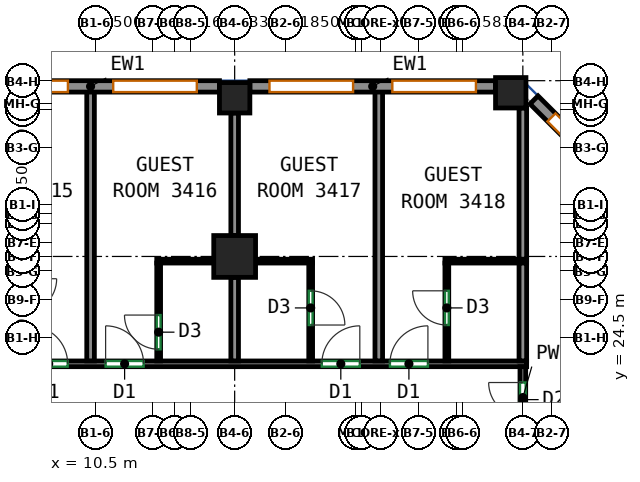
"""IFC4 building model, lengths in metres.
Left out: names, types, materials, properties, quantities, classifications, styles, units other than length and angle.
Written with IfcOpenShell. Run it as: python <this file> out.ifc"""

import sys

from ifc_helpers import new_model, si_unit, direction, frame, frame_2d, origin, origin_2d, place, context, subcontext, project, spatial, rectangle, extrude, source, transform, mapped, element, fill, save


model = new_model("IFC4")
c1 = context("Model", 3, precision=1e-05, world=origin(), true_north=direction((0.0, 1.0)))
c2 = subcontext(c1, "Body", "Model", "MODEL_VIEW")
j1 = project(units=[si_unit("LENGTHUNIT", "METRE"), si_unit("PLANEANGLEUNIT", "RADIAN")], contexts=[c1])
p1 = place(None, origin())
s1 = spatial("IfcSite", under=j1, at=p1, CompositionType="ELEMENT")
p2 = place(p1, origin())
s2 = spatial("IfcBuilding", under=s1, at=p2, CompositionType="ELEMENT")
p3 = place(p2, frame((0.0, 0.0, 150.7)))
s3 = spatial("IfcBuildingStorey", under=s2, at=p3, CompositionType="ELEMENT", Elevation=150.7)
m1 = source(origin(), c2, "Body", "SweptSolid", [
    extrude(rectangle(XDim=1.1, YDim=1.1, at=origin_2d()), origin(), (0.0, 0.0, 1.0), 3.12),
])
p4 = place(p3, frame((14.167, 26.625, 0.0), z_axis=(0.0, 0.0, 1.0), x_axis=(1.0, 0.0, 0.0)))
e1 = element("IfcColumn", 1, at=p4, inside=s3, PredefinedType="COLUMN", context=c2, shape_type="MappedRepresentation", body=[
    mapped(m1, transform((0.0, 0.0, 0.0))),
])
m2 = source(origin(), c2, "Body", "SweptSolid", [
    extrude(rectangle(XDim=0.8, YDim=0.8, at=origin_2d()), origin(), (0.0, 0.0, 1.0), 3.12),
])
for number, where, z_axis, x_axis in (
    (2, (14.167, 30.8, 0.0), (0.0, 0.0, 1.0), (1.0, 0.0, 0.0)),
    (3, (21.432, 30.932, 0.0), (0.0, 0.0, 1.0), (1.0, 0.0, 0.0)),
):
    element("IfcColumn", number, at=place(p3, frame(where, z_axis=z_axis, x_axis=x_axis)), inside=s3, PredefinedType="COLUMN", context=c2, shape_type="MappedRepresentation", body=[
        mapped(m2, transform((0.0, 0.0, 0.0))),
    ])
m3 = source(origin(), c2, "Body", "SweptSolid", [
    extrude(rectangle(XDim=3.5, YDim=0.3, at=frame_2d((1.75, 0.0))), origin(), (0.0, 0.0, 1.0), 3.12),
])
p5 = place(p3, frame((24.519, 28.269, 0.0), z_axis=(0.0, 0.0, 1.0), x_axis=(-0.70707190453, 0.707141656123, 0.0)))
e4 = element("IfcWall", 4, at=p5, inside=s3, PredefinedType="SOLIDWALL", context=c2, shape_type="MappedRepresentation", body=[
    mapped(m3, transform((0.0, 0.0, 0.0))),
])
p6 = place(p5, frame((0.65, 0.0, 0.85)))
e5 = element("IfcOpeningElement", 5, at=p6, cuts=e4, PredefinedType="OPENING", context=c2, shape_type="SweptSolid", body=[
    extrude(rectangle(XDim=2.2, YDim=1.95, at=frame_2d((1.1, 0.975))), frame((0.0, 0.16, 0.0), z_axis=(0.0, -1.0, 0.0), x_axis=(1.0, 0.0, 0.0)), (0.0, 0.0, 1.0), 0.32),
])
m4 = source(origin(), c2, "Body", "SweptSolid", [
    extrude(rectangle(XDim=6.465, YDim=0.3, at=frame_2d((3.232, 0.0))), origin(), (0.0, 0.0, 1.0), 3.12),
])
p7 = place(p3, frame((21.032, 31.1, 0.0), z_axis=(0.0, 0.0, 1.0), x_axis=(-1.0, 0.0, 0.0)))
e6 = element("IfcWall", 6, at=p7, inside=s3, PredefinedType="SOLIDWALL", context=c2, shape_type="MappedRepresentation", body=[
    mapped(m4, transform((0.0, 0.0, 0.0))),
])
p8 = place(p7, frame((0.516, 0.0, 0.85)))
e7 = element("IfcOpeningElement", 7, at=p8, cuts=e6, PredefinedType="OPENING", context=c2, shape_type="SweptSolid", body=[
    extrude(rectangle(XDim=2.2, YDim=1.95, at=frame_2d((1.1, 0.975))), frame((0.0, 0.16, 0.0), z_axis=(0.0, -1.0, 0.0), x_axis=(1.0, 0.0, 0.0)), (0.0, 0.0, 1.0), 0.32),
])
p9 = place(p7, frame((3.749, 0.0, 0.85)))
e8 = element("IfcOpeningElement", 8, at=p9, cuts=e6, PredefinedType="OPENING", context=c2, shape_type="SweptSolid", body=[
    extrude(rectangle(XDim=2.2, YDim=1.95, at=frame_2d((1.1, 0.975))), frame((0.0, 0.16, 0.0), z_axis=(0.0, -1.0, 0.0), x_axis=(1.0, 0.0, 0.0)), (0.0, 0.0, 1.0), 0.32),
])
m5 = source(origin(), c2, "Body", "SweptSolid", [
    extrude(rectangle(XDim=6.783, YDim=0.3, at=frame_2d((3.392, 0.0))), origin(), (0.0, 0.0, 1.0), 3.12),
])
p10 = place(p3, frame((13.767, 31.1, 0.0), z_axis=(0.0, 0.0, 1.0), x_axis=(-1.0, 0.0, 0.0)))
e9 = element("IfcWall", 9, at=p10, inside=s3, PredefinedType="SOLIDWALL", context=c2, shape_type="MappedRepresentation", body=[
    mapped(m5, transform((0.0, 0.0, 0.0))),
])
p11 = place(p10, frame((0.596, 0.0, 0.85)))
e10 = element("IfcOpeningElement", 10, at=p11, cuts=e9, PredefinedType="OPENING", context=c2, shape_type="SweptSolid", body=[
    extrude(rectangle(XDim=2.2, YDim=1.95, at=frame_2d((1.1, 0.975))), frame((0.0, 0.16, 0.0), z_axis=(0.0, -1.0, 0.0), x_axis=(1.0, 0.0, 0.0)), (0.0, 0.0, 1.0), 0.32),
])
p12 = place(p10, frame((3.988, 0.0, 0.85)))
e11 = element("IfcOpeningElement", 11, at=p12, cuts=e9, PredefinedType="OPENING", context=c2, shape_type="SweptSolid", body=[
    extrude(rectangle(XDim=2.2, YDim=1.95, at=frame_2d((1.1, 0.975))), frame((0.0, 0.16, 0.0), z_axis=(0.0, -1.0, 0.0), x_axis=(1.0, 0.0, 0.0)), (0.0, 0.0, 1.0), 0.32),
])
p13 = place(p3, frame((-20.059, 23.8, 0.0), z_axis=(0.0, 0.0, 1.0), x_axis=(1.0, 0.0, 0.0)))
e12 = element("IfcWall", 12, at=p13, inside=s3, PredefinedType="PARTITIONING", context=c2, shape_type="SweptSolid", body=[
    extrude(rectangle(XDim=41.909, YDim=0.15, at=frame_2d((20.955, 0.0))), origin(), (0.0, 0.0, 1.0), 3.12),
])
p14 = place(p13, frame((0.3, 0.0, 0.0)))
e13 = element("IfcOpeningElement", 13, at=p14, cuts=e12, PredefinedType="OPENING", context=c2, shape_type="SweptSolid", body=[
    extrude(rectangle(XDim=1.0, YDim=2.1, at=frame_2d((0.5, 1.05))), frame((0.0, 0.085, 0.0), z_axis=(0.0, -1.0, 0.0), x_axis=(1.0, 0.0, 0.0)), (0.0, 0.0, 1.0), 0.17),
])
p15 = place(p13, frame((6.391, 0.0, 0.0)))
e14 = element("IfcOpeningElement", 14, at=p15, cuts=e12, PredefinedType="OPENING", context=c2, shape_type="SweptSolid", body=[
    extrude(rectangle(XDim=1.0, YDim=2.1, at=frame_2d((0.5, 1.05))), frame((0.0, 0.085, 0.0), z_axis=(0.0, -1.0, 0.0), x_axis=(1.0, 0.0, 0.0)), (0.0, 0.0, 1.0), 0.17),
])
p16 = place(p13, frame((8.183, 0.0, 0.0)))
e15 = element("IfcOpeningElement", 15, at=p16, cuts=e12, PredefinedType="OPENING", context=c2, shape_type="SweptSolid", body=[
    extrude(rectangle(XDim=1.0, YDim=2.1, at=frame_2d((0.5, 1.05))), frame((0.0, 0.085, 0.0), z_axis=(0.0, -1.0, 0.0), x_axis=(1.0, 0.0, 0.0)), (0.0, 0.0, 1.0), 0.17),
])
p17 = place(p13, frame((13.872, 0.0, 0.0)))
e16 = element("IfcOpeningElement", 16, at=p17, cuts=e12, PredefinedType="OPENING", context=c2, shape_type="SweptSolid", body=[
    extrude(rectangle(XDim=1.0, YDim=2.1, at=frame_2d((0.5, 1.05))), frame((0.0, 0.085, 0.0), z_axis=(0.0, -1.0, 0.0), x_axis=(1.0, 0.0, 0.0)), (0.0, 0.0, 1.0), 0.17),
])
p18 = place(p13, frame((15.457, 0.0, 0.0)))
e17 = element("IfcOpeningElement", 17, at=p18, cuts=e12, PredefinedType="OPENING", context=c2, shape_type="SweptSolid", body=[
    extrude(rectangle(XDim=1.0, YDim=2.1, at=frame_2d((0.5, 1.05))), frame((0.0, 0.085, 0.0), z_axis=(0.0, -1.0, 0.0), x_axis=(1.0, 0.0, 0.0)), (0.0, 0.0, 1.0), 0.17),
])
p19 = place(p13, frame((21.199, 0.0, 0.0)))
e18 = element("IfcOpeningElement", 18, at=p19, cuts=e12, PredefinedType="OPENING", context=c2, shape_type="SweptSolid", body=[
    extrude(rectangle(XDim=1.0, YDim=2.1, at=frame_2d((0.5, 1.05))), frame((0.0, 0.085, 0.0), z_axis=(0.0, -1.0, 0.0), x_axis=(1.0, 0.0, 0.0)), (0.0, 0.0, 1.0), 0.17),
])
p20 = place(p13, frame((23.212, 0.0, 0.0)))
e19 = element("IfcOpeningElement", 19, at=p20, cuts=e12, PredefinedType="OPENING", context=c2, shape_type="SweptSolid", body=[
    extrude(rectangle(XDim=1.0, YDim=2.1, at=frame_2d((0.5, 1.05))), frame((0.0, 0.085, 0.0), z_axis=(0.0, -1.0, 0.0), x_axis=(1.0, 0.0, 0.0)), (0.0, 0.0, 1.0), 0.17),
])
p21 = place(p13, frame((28.832, 0.0, 0.0)))
e20 = element("IfcOpeningElement", 20, at=p21, cuts=e12, PredefinedType="OPENING", context=c2, shape_type="SweptSolid", body=[
    extrude(rectangle(XDim=1.0, YDim=2.1, at=frame_2d((0.5, 1.05))), frame((0.0, 0.085, 0.0), z_axis=(0.0, -1.0, 0.0), x_axis=(1.0, 0.0, 0.0)), (0.0, 0.0, 1.0), 0.17),
])
p22 = place(p13, frame((30.83, 0.0, 0.0)))
e21 = element("IfcOpeningElement", 21, at=p22, cuts=e12, PredefinedType="OPENING", context=c2, shape_type="SweptSolid", body=[
    extrude(rectangle(XDim=1.0, YDim=2.1, at=frame_2d((0.5, 1.05))), frame((0.0, 0.085, 0.0), z_axis=(0.0, -1.0, 0.0), x_axis=(1.0, 0.0, 0.0)), (0.0, 0.0, 1.0), 0.17),
])
p23 = place(p13, frame((36.519, 0.0, 0.0)))
e22 = element("IfcOpeningElement", 22, at=p23, cuts=e12, PredefinedType="OPENING", context=c2, shape_type="SweptSolid", body=[
    extrude(rectangle(XDim=1.0, YDim=2.1, at=frame_2d((0.5, 1.05))), frame((0.0, 0.085, 0.0), z_axis=(0.0, -1.0, 0.0), x_axis=(1.0, 0.0, 0.0)), (0.0, 0.0, 1.0), 0.17),
])
p24 = place(p13, frame((38.311, 0.0, 0.0)))
e23 = element("IfcOpeningElement", 23, at=p24, cuts=e12, PredefinedType="OPENING", context=c2, shape_type="SweptSolid", body=[
    extrude(rectangle(XDim=1.0, YDim=2.1, at=frame_2d((0.5, 1.05))), frame((0.0, 0.085, 0.0), z_axis=(0.0, -1.0, 0.0), x_axis=(1.0, 0.0, 0.0)), (0.0, 0.0, 1.0), 0.17),
])
p25 = place(p3, frame((21.75, 22.1, 0.0), z_axis=(0.0, 0.0, 1.0), x_axis=(0.0, 1.0, 0.0)))
e24 = element("IfcWall", 24, at=p25, inside=s3, PredefinedType="PARTITIONING", context=c2, shape_type="SweptSolid", body=[
    extrude(rectangle(XDim=1.625, YDim=0.15, at=frame_2d((0.812, 0.0))), origin(), (0.0, 0.0, 1.0), 3.12),
])
p26 = place(p25, frame((0.308, 0.0, 0.0)))
e25 = element("IfcOpeningElement", 25, at=p26, cuts=e24, PredefinedType="OPENING", context=c2, shape_type="SweptSolid", body=[
    extrude(rectangle(XDim=0.9, YDim=2.1, at=frame_2d((0.45, 1.05))), frame((0.0, 0.085, 0.0), z_axis=(0.0, -1.0, 0.0), x_axis=(1.0, 0.0, 0.0)), (0.0, 0.0, 1.0), 0.17),
])
p27 = place(p3, frame((10.375, 23.877, 0.0), z_axis=(0.0, 0.0, 1.0), x_axis=(0.0, 1.0, 0.0)))
e26 = element("IfcWall", 26, at=p27, inside=s3, PredefinedType="PARTITIONING", context=c2, shape_type="SweptSolid", body=[
    extrude(rectangle(XDim=7.123, YDim=0.2, at=frame_2d((3.562, 0.0))), origin(), (0.0, 0.0, 1.0), 3.12),
])
p28 = place(p3, frame((12.117, 26.502, 0.0), z_axis=(0.0, 0.0, 1.0), x_axis=(1.0, 0.0, 0.0)))
e27 = element("IfcWall", 27, at=p28, inside=s3, PredefinedType="PARTITIONING", context=c2, shape_type="SweptSolid", body=[
    extrude(rectangle(XDim=1.5, YDim=0.1, at=frame_2d((0.75, 0.0))), origin(), (0.0, 0.0, 1.0), 3.12),
])
p29 = place(p3, frame((12.167, 23.877, 0.0), z_axis=(0.0, 0.0, 1.0), x_axis=(0.0, 1.0, 0.0)))
e28 = element("IfcWall", 28, at=p29, inside=s3, PredefinedType="PARTITIONING", context=c2, shape_type="SweptSolid", body=[
    extrude(rectangle(XDim=2.575, YDim=0.1, at=frame_2d((1.288, 0.0))), origin(), (0.0, 0.0, 1.0), 3.12),
])
p30 = place(p29, frame((0.306, 0.0, 0.0)))
e29 = element("IfcOpeningElement", 29, at=p30, cuts=e28, PredefinedType="OPENING", context=c2, shape_type="SweptSolid", body=[
    extrude(rectangle(XDim=0.9, YDim=2.1, at=frame_2d((0.45, 1.05))), frame((0.0, 0.06, 0.0), z_axis=(0.0, -1.0, 0.0), x_axis=(1.0, 0.0, 0.0)), (0.0, 0.0, 1.0), 0.12),
])
p31 = place(p3, frame((14.167, 27.175, 0.0), z_axis=(0.0, 0.0, 1.0), x_axis=(0.0, 1.0, 0.0)))
e30 = element("IfcWall", 30, at=p31, inside=s3, PredefinedType="PARTITIONING", context=c2, shape_type="SweptSolid", body=[
    extrude(rectangle(XDim=3.225, YDim=0.2, at=frame_2d((1.612, 0.0))), origin(), (0.0, 0.0, 1.0), 3.12),
])
p32 = place(p3, frame((14.167, 23.877, 0.0), z_axis=(0.0, 0.0, 1.0), x_axis=(0.0, 1.0, 0.0)))
e31 = element("IfcWall", 31, at=p32, inside=s3, PredefinedType="PARTITIONING", context=c2, shape_type="SweptSolid", body=[
    extrude(rectangle(XDim=2.198, YDim=0.2, at=frame_2d((1.099, 0.0))), origin(), (0.0, 0.0, 1.0), 3.12),
])
p33 = place(p3, frame((14.717, 26.502, 0.0), z_axis=(0.0, 0.0, 1.0), x_axis=(1.0, 0.0, 0.0)))
e32 = element("IfcWall", 32, at=p33, inside=s3, PredefinedType="PARTITIONING", context=c2, shape_type="SweptSolid", body=[
    extrude(rectangle(XDim=1.5, YDim=0.1, at=frame_2d((0.75, 0.0))), origin(), (0.0, 0.0, 1.0), 3.12),
])
p34 = place(p3, frame((16.167, 26.452, 0.0), z_axis=(0.0, 0.0, 1.0), x_axis=(0.0, -1.0, 0.0)))
e33 = element("IfcWall", 33, at=p34, inside=s3, PredefinedType="PARTITIONING", context=c2, shape_type="SweptSolid", body=[
    extrude(rectangle(XDim=2.575, YDim=0.1, at=frame_2d((1.288, 0.0))), origin(), (0.0, 0.0, 1.0), 3.12),
])
p35 = place(p34, frame((0.731, 0.0, 0.0)))
e34 = element("IfcOpeningElement", 34, at=p35, cuts=e33, PredefinedType="OPENING", context=c2, shape_type="SweptSolid", body=[
    extrude(rectangle(XDim=0.9, YDim=2.1, at=frame_2d((0.45, 1.05))), frame((0.0, 0.06, 0.0), z_axis=(0.0, -1.0, 0.0), x_axis=(1.0, 0.0, 0.0)), (0.0, 0.0, 1.0), 0.12),
])
p36 = place(p3, frame((17.959, 23.877, 0.0), z_axis=(0.0, 0.0, 1.0), x_axis=(0.0, 1.0, 0.0)))
e35 = element("IfcWall", 35, at=p36, inside=s3, PredefinedType="PARTITIONING", context=c2, shape_type="SweptSolid", body=[
    extrude(rectangle(XDim=7.123, YDim=0.2, at=frame_2d((3.562, 0.0))), origin(), (0.0, 0.0, 1.0), 3.12),
])
p37 = place(p3, frame((19.7, 26.502, 0.0), z_axis=(0.0, 0.0, 1.0), x_axis=(1.0, 0.0, 0.0)))
e36 = element("IfcWall", 36, at=p37, inside=s3, PredefinedType="PARTITIONING", context=c2, shape_type="SweptSolid", body=[
    extrude(rectangle(XDim=2.15, YDim=0.1, at=frame_2d((1.075, 0.0))), origin(), (0.0, 0.0, 1.0), 3.12),
])
p38 = place(p3, frame((19.75, 23.877, 0.0), z_axis=(0.0, 0.0, 1.0), x_axis=(0.0, 1.0, 0.0)))
e37 = element("IfcWall", 37, at=p38, inside=s3, PredefinedType="PARTITIONING", context=c2, shape_type="SweptSolid", body=[
    extrude(rectangle(XDim=2.575, YDim=0.1, at=frame_2d((1.288, 0.0))), origin(), (0.0, 0.0, 1.0), 3.12),
])
p39 = place(p38, frame((0.944, 0.0, 0.0)))
e38 = element("IfcOpeningElement", 38, at=p39, cuts=e37, PredefinedType="OPENING", context=c2, shape_type="SweptSolid", body=[
    extrude(rectangle(XDim=0.9, YDim=2.1, at=frame_2d((0.45, 1.05))), frame((0.0, 0.06, 0.0), z_axis=(0.0, -1.0, 0.0), x_axis=(1.0, 0.0, 0.0)), (0.0, 0.0, 1.0), 0.12),
])
p40 = place(p3, frame((21.75, 26.552, 0.0), z_axis=(0.0, 0.0, 1.0), x_axis=(0.0, 1.0, 0.0)))
e39 = element("IfcWall", 39, at=p40, inside=s3, PredefinedType="PARTITIONING", context=c2, shape_type="SweptSolid", body=[
    extrude(rectangle(XDim=3.98, YDim=0.2, at=frame_2d((1.99, 0.0))), origin(), (0.0, 0.0, 1.0), 3.12),
])
p41 = place(p3, frame((21.75, 23.877, 0.0), z_axis=(0.0, 0.0, 1.0), x_axis=(0.0, 1.0, 0.0)))
e40 = element("IfcWall", 40, at=p41, inside=s3, PredefinedType="PARTITIONING", context=c2, shape_type="SweptSolid", body=[
    extrude(rectangle(XDim=2.575, YDim=0.2, at=frame_2d((1.288, 0.0))), origin(), (0.0, 0.0, 1.0), 3.12),
])
p42 = place(p6, origin())
e41 = element("IfcWindow", 41, at=p42, inside=s3, PartitioningType="SINGLE_PANEL", PredefinedType="WINDOW", context=c2, shape_type="SweptSolid", body=[
    extrude(rectangle(XDim=2.2, YDim=1.95, at=frame_2d((1.1, 0.975))), frame((0.0, 0.03, 0.0), z_axis=(0.0, -1.0, 0.0), x_axis=(1.0, 0.0, 0.0)), (0.0, 0.0, 1.0), 0.06),
])
fill(e5, e41)
p43 = place(p8, origin())
e42 = element("IfcWindow", 42, at=p43, inside=s3, PartitioningType="SINGLE_PANEL", PredefinedType="WINDOW", context=c2, shape_type="SweptSolid", body=[
    extrude(rectangle(XDim=2.2, YDim=1.95, at=frame_2d((1.1, 0.975))), frame((0.0, 0.03, 0.0), z_axis=(0.0, -1.0, 0.0), x_axis=(1.0, 0.0, 0.0)), (0.0, 0.0, 1.0), 0.06),
])
fill(e7, e42)
p44 = place(p9, origin())
e43 = element("IfcWindow", 43, at=p44, inside=s3, PartitioningType="SINGLE_PANEL", PredefinedType="WINDOW", context=c2, shape_type="SweptSolid", body=[
    extrude(rectangle(XDim=2.2, YDim=1.95, at=frame_2d((1.1, 0.975))), frame((0.0, 0.03, 0.0), z_axis=(0.0, -1.0, 0.0), x_axis=(1.0, 0.0, 0.0)), (0.0, 0.0, 1.0), 0.06),
])
fill(e8, e43)
p45 = place(p11, origin())
e44 = element("IfcWindow", 44, at=p45, inside=s3, PartitioningType="SINGLE_PANEL", PredefinedType="WINDOW", context=c2, shape_type="SweptSolid", body=[
    extrude(rectangle(XDim=2.2, YDim=1.95, at=frame_2d((1.1, 0.975))), frame((0.0, 0.03, 0.0), z_axis=(0.0, -1.0, 0.0), x_axis=(1.0, 0.0, 0.0)), (0.0, 0.0, 1.0), 0.06),
])
fill(e10, e44)
p46 = place(p12, origin())
e45 = element("IfcWindow", 45, at=p46, inside=s3, PartitioningType="SINGLE_PANEL", PredefinedType="WINDOW", context=c2, shape_type="SweptSolid", body=[
    extrude(rectangle(XDim=2.2, YDim=1.95, at=frame_2d((1.1, 0.975))), frame((0.0, 0.03, 0.0), z_axis=(0.0, -1.0, 0.0), x_axis=(1.0, 0.0, 0.0)), (0.0, 0.0, 1.0), 0.06),
])
fill(e11, e45)
p47 = place(p26, origin())
e46 = element("IfcDoor", 46, at=p47, inside=s3, OperationType="SINGLE_SWING_RIGHT", PredefinedType="DOOR", context=c2, shape_type="SweptSolid", body=[
    extrude(rectangle(XDim=0.9, YDim=2.1, at=frame_2d((0.45, 1.05))), frame((0.0, 0.025, 0.0), z_axis=(0.0, -1.0, 0.0), x_axis=(1.0, 0.0, 0.0)), (0.0, 0.0, 1.0), 0.05),
])
fill(e25, e46)
p48 = place(p21, origin())
e47 = element("IfcDoor", 47, at=p48, inside=s3, OperationType="SINGLE_SWING_LEFT", PredefinedType="DOOR", context=c2, shape_type="SweptSolid", body=[
    extrude(rectangle(XDim=1.0, YDim=2.1, at=frame_2d((0.5, 1.05))), frame((0.0, 0.025, 0.0), z_axis=(0.0, -1.0, 0.0), x_axis=(1.0, 0.0, 0.0)), (0.0, 0.0, 1.0), 0.05),
])
fill(e20, e47)
p49 = place(p22, origin())
e48 = element("IfcDoor", 48, at=p49, inside=s3, OperationType="SINGLE_SWING_LEFT", PredefinedType="DOOR", context=c2, shape_type="SweptSolid", body=[
    extrude(rectangle(XDim=1.0, YDim=2.1, at=frame_2d((0.5, 1.05))), frame((0.0, 0.025, 0.0), z_axis=(0.0, -1.0, 0.0), x_axis=(1.0, 0.0, 0.0)), (0.0, 0.0, 1.0), 0.05),
])
fill(e21, e48)
p50 = place(p23, origin())
e49 = element("IfcDoor", 49, at=p50, inside=s3, OperationType="SINGLE_SWING_RIGHT", PredefinedType="DOOR", context=c2, shape_type="SweptSolid", body=[
    extrude(rectangle(XDim=1.0, YDim=2.1, at=frame_2d((0.5, 1.05))), frame((0.0, 0.025, 0.0), z_axis=(0.0, -1.0, 0.0), x_axis=(1.0, 0.0, 0.0)), (0.0, 0.0, 1.0), 0.05),
])
fill(e22, e49)
p51 = place(p24, origin())
e50 = element("IfcDoor", 50, at=p51, inside=s3, OperationType="SINGLE_SWING_RIGHT", PredefinedType="DOOR", context=c2, shape_type="SweptSolid", body=[
    extrude(rectangle(XDim=1.0, YDim=2.1, at=frame_2d((0.5, 1.05))), frame((0.0, 0.025, 0.0), z_axis=(0.0, -1.0, 0.0), x_axis=(1.0, 0.0, 0.0)), (0.0, 0.0, 1.0), 0.05),
])
fill(e23, e50)
p52 = place(p30, origin())
e51 = element("IfcDoor", 51, at=p52, inside=s3, OperationType="SINGLE_SWING_RIGHT", PredefinedType="DOOR", context=c2, shape_type="SweptSolid", body=[
    extrude(rectangle(XDim=0.9, YDim=2.1, at=frame_2d((0.45, 1.05))), frame((0.0, 0.025, 0.0), z_axis=(0.0, -1.0, 0.0), x_axis=(1.0, 0.0, 0.0)), (0.0, 0.0, 1.0), 0.05),
])
fill(e29, e51)
p53 = place(p35, origin())
e52 = element("IfcDoor", 52, at=p53, inside=s3, OperationType="SINGLE_SWING_RIGHT", PredefinedType="DOOR", context=c2, shape_type="SweptSolid", body=[
    extrude(rectangle(XDim=0.9, YDim=2.1, at=frame_2d((0.45, 1.05))), frame((0.0, 0.025, 0.0), z_axis=(0.0, -1.0, 0.0), x_axis=(1.0, 0.0, 0.0)), (0.0, 0.0, 1.0), 0.05),
])
fill(e34, e52)
p54 = place(p39, origin())
e53 = element("IfcDoor", 53, at=p54, inside=s3, OperationType="SINGLE_SWING_RIGHT", PredefinedType="DOOR", context=c2, shape_type="SweptSolid", body=[
    extrude(rectangle(XDim=0.9, YDim=2.1, at=frame_2d((0.45, 1.05))), frame((0.0, 0.025, 0.0), z_axis=(0.0, -1.0, 0.0), x_axis=(1.0, 0.0, 0.0)), (0.0, 0.0, 1.0), 0.05),
])
fill(e38, e53)
save(model, sys.argv[1])
